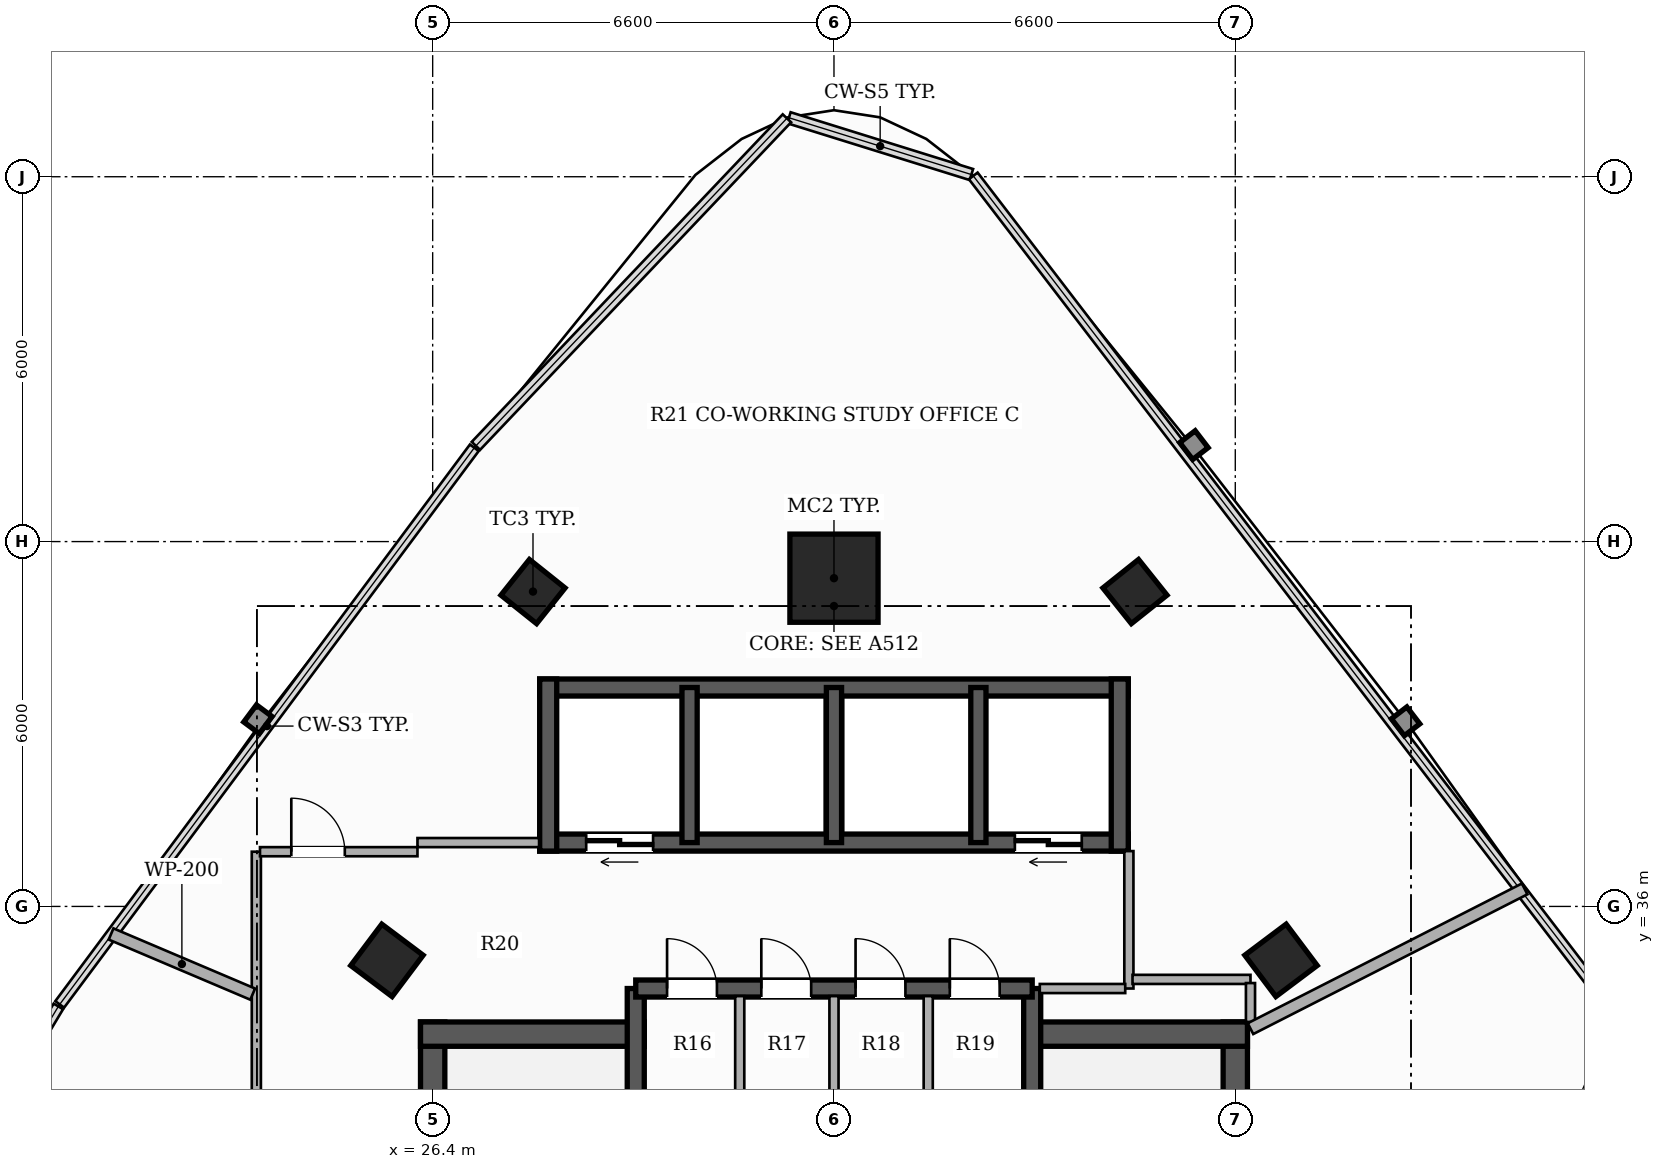
"""IFC4 building model, lengths in metres.
Left out: names, types, materials, properties, quantities, classifications, styles, units other than length and angle.
Written with IfcOpenShell. Run it as: python <this file> out.ifc"""

import sys

from ifc_helpers import new_model, si_unit, direction, frame, frame_2d, origin, origin_2d, place, context, subcontext, project, spatial, rectangle, hollow_rectangle, extrude, element, fill, save


model = new_model("IFC4")
c1 = context("Model", 3, precision=1e-05, world=origin(), true_north=direction((0.0, 1.0)))
c2 = subcontext(c1, "Body", "Model", "MODEL_VIEW")
j1 = project(units=[si_unit("LENGTHUNIT", "METRE"), si_unit("PLANEANGLEUNIT", "RADIAN")], contexts=[c1])
p1 = place(None, origin())
s1 = spatial("IfcSite", under=j1, at=p1, CompositionType="ELEMENT")
p2 = place(p1, origin())
s2 = spatial("IfcBuilding", under=s1, at=p2, CompositionType="ELEMENT")
p3 = place(p2, frame((0.0, 0.0, 133.1)))
s3 = spatial("IfcBuildingStorey", under=s2, at=p3, CompositionType="ELEMENT", Elevation=133.1)
p4 = place(p3, frame((26.4, 26.5, 0.0), z_axis=(0.0, 0.0, 1.0), x_axis=(0.0, 1.0, 0.0)))
e1 = element("IfcWall", 1, at=p4, inside=s3, PredefinedType="SHEAR", context=c2, shape_type="SweptSolid", body=[
    extrude(rectangle(XDim=7.6, YDim=0.4, at=frame_2d((3.8, 0.0))), origin(), (0.0, 0.0, 1.0), 3.3),
])
p5 = place(p3, frame((26.2, 33.9, 0.0), z_axis=(0.0, 0.0, 1.0), x_axis=(1.0, 0.0, 0.0)))
e2 = element("IfcWall", 2, at=p5, inside=s3, PredefinedType="SHEAR", context=c2, shape_type="SweptSolid", body=[
    extrude(rectangle(XDim=3.68, YDim=0.4, at=frame_2d((1.84, 0.0))), origin(), (0.0, 0.0, 1.0), 3.3),
])
p6 = place(p3, frame((39.6, 26.5, 0.0), z_axis=(0.0, 0.0, 1.0), x_axis=(0.0, 1.0, 0.0)))
e3 = element("IfcWall", 3, at=p6, inside=s3, PredefinedType="SHEAR", context=c2, shape_type="SweptSolid", body=[
    extrude(rectangle(XDim=7.6, YDim=0.4, at=frame_2d((3.8, 0.0))), origin(), (0.0, 0.0, 1.0), 3.3),
])
p7 = place(p3, frame((36.12, 33.9, 0.0), z_axis=(0.0, 0.0, 1.0), x_axis=(1.0, 0.0, 0.0)))
e4 = element("IfcWall", 4, at=p7, inside=s3, PredefinedType="SHEAR", context=c2, shape_type="SweptSolid", body=[
    extrude(rectangle(XDim=3.68, YDim=0.4, at=frame_2d((1.84, 0.0))), origin(), (0.0, 0.0, 1.0), 3.3),
])
p8 = place(p3, frame((29.74, 26.5, 0.0), z_axis=(0.0, 0.0, 1.0), x_axis=(0.0, 1.0, 0.0)))
e5 = element("IfcWall", 5, at=p8, inside=s3, PredefinedType="SHEAR", context=c2, shape_type="SweptSolid", body=[
    extrude(rectangle(XDim=8.15, YDim=0.28, at=frame_2d((4.075, 0.0))), origin(), (0.0, 0.0, 1.0), 3.3),
])
p9 = place(p8, frame((0.6, 0.0, 0.0)))
e6 = element("IfcOpeningElement", 6, at=p9, cuts=e5, PredefinedType="OPENING", context=c2, shape_type="SweptSolid", body=[
    extrude(rectangle(XDim=1.05, YDim=2.15, at=frame_2d((0.525, 1.075))), frame((0.0, 0.15, 0.0), z_axis=(0.0, -1.0, 0.0), x_axis=(1.0, 0.0, 0.0)), (0.0, 0.0, 1.0), 0.3),
])
p10 = place(p3, frame((36.26, 26.5, 0.0), z_axis=(0.0, 0.0, 1.0), x_axis=(0.0, 1.0, 0.0)))
e7 = element("IfcWall", 7, at=p10, inside=s3, PredefinedType="SHEAR", context=c2, shape_type="SweptSolid", body=[
    extrude(rectangle(XDim=8.15, YDim=0.28, at=frame_2d((4.075, 0.0))), origin(), (0.0, 0.0, 1.0), 3.3),
])
p11 = place(p10, frame((0.6, 0.0, 0.0)))
e8 = element("IfcOpeningElement", 8, at=p11, cuts=e7, PredefinedType="OPENING", context=c2, shape_type="SweptSolid", body=[
    extrude(rectangle(XDim=1.05, YDim=2.15, at=frame_2d((0.525, 1.075))), frame((0.0, 0.15, 0.0), z_axis=(0.0, -1.0, 0.0), x_axis=(1.0, 0.0, 0.0)), (0.0, 0.0, 1.0), 0.3),
])
p12 = place(p3, frame((29.74, 34.65, 0.0), z_axis=(0.0, 0.0, 1.0), x_axis=(1.0, 0.0, 0.0)))
e9 = element("IfcWall", 9, at=p12, inside=s3, PredefinedType="SHEAR", context=c2, shape_type="SweptSolid", body=[
    extrude(rectangle(XDim=6.52, YDim=0.28, at=frame_2d((3.26, 0.0))), origin(), (0.0, 0.0, 1.0), 3.3),
])
p13 = place(p12, frame((0.515, 0.0, 0.0)))
e10 = element("IfcOpeningElement", 10, at=p13, cuts=e9, PredefinedType="OPENING", context=c2, shape_type="SweptSolid", body=[
    extrude(rectangle(XDim=0.82, YDim=2.1, at=frame_2d((0.41, 1.05))), frame((0.0, 0.15, 0.0), z_axis=(0.0, -1.0, 0.0), x_axis=(1.0, 0.0, 0.0)), (0.0, 0.0, 1.0), 0.3),
])
p14 = place(p12, frame((2.065, 0.0, 0.0)))
e11 = element("IfcOpeningElement", 11, at=p14, cuts=e9, PredefinedType="OPENING", context=c2, shape_type="SweptSolid", body=[
    extrude(rectangle(XDim=0.82, YDim=2.1, at=frame_2d((0.41, 1.05))), frame((0.0, 0.15, 0.0), z_axis=(0.0, -1.0, 0.0), x_axis=(1.0, 0.0, 0.0)), (0.0, 0.0, 1.0), 0.3),
])
p15 = place(p12, frame((3.615, 0.0, 0.0)))
e12 = element("IfcOpeningElement", 12, at=p15, cuts=e9, PredefinedType="OPENING", context=c2, shape_type="SweptSolid", body=[
    extrude(rectangle(XDim=0.82, YDim=2.1, at=frame_2d((0.41, 1.05))), frame((0.0, 0.15, 0.0), z_axis=(0.0, -1.0, 0.0), x_axis=(1.0, 0.0, 0.0)), (0.0, 0.0, 1.0), 0.3),
])
p16 = place(p12, frame((5.165, 0.0, 0.0)))
e13 = element("IfcOpeningElement", 13, at=p16, cuts=e9, PredefinedType="OPENING", context=c2, shape_type="SweptSolid", body=[
    extrude(rectangle(XDim=0.82, YDim=2.1, at=frame_2d((0.41, 1.05))), frame((0.0, 0.15, 0.0), z_axis=(0.0, -1.0, 0.0), x_axis=(1.0, 0.0, 0.0)), (0.0, 0.0, 1.0), 0.3),
])
p17 = place(p3, frame((37.84, 37.05, 0.0), z_axis=(0.0, 0.0, 1.0), x_axis=(-1.0, 0.0, 0.0)))
e14 = element("IfcWall", 14, at=p17, inside=s3, PredefinedType="SHEAR", context=c2, shape_type="SweptSolid", body=[
    extrude(rectangle(XDim=9.68, YDim=0.28, at=frame_2d((4.84, 0.0))), origin(), (0.0, 0.0, 1.0), 3.3),
])
p18 = place(p17, frame((7.815, 0.0, 0.0)))
e15 = element("IfcOpeningElement", 15, at=p18, cuts=e14, PredefinedType="OPENING", context=c2, shape_type="SweptSolid", body=[
    extrude(rectangle(XDim=1.1, YDim=2.2, at=frame_2d((0.55, 1.1))), frame((0.0, 0.15, 0.0), z_axis=(0.0, -1.0, 0.0), x_axis=(1.0, 0.0, 0.0)), (0.0, 0.0, 1.0), 0.3),
])
p19 = place(p17, frame((0.765, 0.0, 0.0)))
e16 = element("IfcOpeningElement", 16, at=p19, cuts=e14, PredefinedType="OPENING", context=c2, shape_type="SweptSolid", body=[
    extrude(rectangle(XDim=1.1, YDim=2.2, at=frame_2d((0.55, 1.1))), frame((0.0, 0.15, 0.0), z_axis=(0.0, -1.0, 0.0), x_axis=(1.0, 0.0, 0.0)), (0.0, 0.0, 1.0), 0.3),
])
p20 = place(p3, frame((28.16, 39.6, 0.0), z_axis=(0.0, 0.0, 1.0), x_axis=(1.0, 0.0, 0.0)))
e17 = element("IfcWall", 17, at=p20, inside=s3, PredefinedType="SHEAR", context=c2, shape_type="SweptSolid", body=[
    extrude(rectangle(XDim=9.68, YDim=0.28, at=frame_2d((4.84, 0.0))), origin(), (0.0, 0.0, 1.0), 3.3),
])
for number, where, z_axis, x_axis in (
    (18, (28.3, 36.91, 0.0), (0.0, 0.0, 1.0), (0.0, 1.0, 0.0)),
    (19, (37.7, 36.91, 0.0), (0.0, 0.0, 1.0), (0.0, 1.0, 0.0)),
):
    element("IfcWall", number, at=place(p3, frame(where, z_axis=z_axis, x_axis=x_axis)), inside=s3, PredefinedType="SHEAR", context=c2, shape_type="SweptSolid", body=[
        extrude(rectangle(XDim=2.83, YDim=0.28, at=frame_2d((1.415, 0.0))), origin(), (0.0, 0.0, 1.0), 3.3),
    ])
for number, where, z_axis, x_axis in (
    (20, (30.625, 37.05, 0.0), (0.0, 0.0, 1.0), (0.0, 1.0, 0.0)),
    (21, (33.0, 37.05, 0.0), (0.0, 0.0, 1.0), (0.0, 1.0, 0.0)),
    (22, (35.375, 37.05, 0.0), (0.0, 0.0, 1.0), (0.0, 1.0, 0.0)),
):
    element("IfcWall", number, at=place(p3, frame(where, z_axis=z_axis, x_axis=x_axis)), inside=s3, PredefinedType="SHEAR", context=c2, shape_type="SweptSolid", body=[
        extrude(rectangle(XDim=2.55, YDim=0.25, at=frame_2d((1.275, 0.0))), origin(), (0.0, 0.0, 1.0), 3.3),
    ])
p21 = place(p3, frame((33.0, 41.398, 0.0), z_axis=(0.0, 0.0, 1.0), x_axis=(1.0, 0.0, 0.0)))
e23 = element("IfcColumn", 23, at=p21, inside=s3, PredefinedType="COLUMN", context=c2, shape_type="SweptSolid", body=[
    extrude(hollow_rectangle(XDim=1.45, YDim=1.45, WallThickness=0.045, at=origin_2d()), origin(), (0.0, 0.0, 1.0), 3.3),
])
for number, where, z_axis, x_axis in (
    (24, (25.648, 35.113, 0.0), (0.0, 0.0, 1.0), (0.6, 0.8, 0.0)),
    (25, (40.352, 35.113, 0.0), (0.0, 0.0, 1.0), (-0.6, 0.8, 0.0)),
):
    element("IfcColumn", number, at=place(p3, frame(where, z_axis=z_axis, x_axis=x_axis)), inside=s3, PredefinedType="COLUMN", context=c2, shape_type="SweptSolid", body=[
        extrude(hollow_rectangle(XDim=0.85, YDim=0.85, WallThickness=0.028, at=origin_2d()), origin(), (0.0, 0.0, 1.0), 3.3),
    ])
for number, where, z_axis, x_axis in (
    (26, (28.05, 41.178, 0.0), (0.0, 0.0, 1.0), (0.624, 0.782, 0.0)),
    (27, (37.95, 41.178, 0.0), (0.0, 0.0, 1.0), (-0.624, 0.782, 0.0)),
):
    element("IfcColumn", number, at=place(p3, frame(where, z_axis=z_axis, x_axis=x_axis)), inside=s3, PredefinedType="COLUMN", context=c2, shape_type="SweptSolid", body=[
        extrude(hollow_rectangle(XDim=0.75, YDim=0.75, WallThickness=0.025, at=origin_2d()), origin(), (0.0, 0.0, 1.0), 3.3),
    ])
p22 = place(p3, frame((37.85, 34.65, 0.0), z_axis=(0.0, 0.0, 1.0), x_axis=(0.0, 1.0, 0.0)))
e28 = element("IfcWall", 28, at=p22, inside=s3, PredefinedType="PARTITIONING", context=c2, shape_type="SweptSolid", body=[
    extrude(rectangle(XDim=2.26, YDim=0.15, at=frame_2d((1.13, 0.0))), origin(), (0.0, 0.0, 1.0), 3.06),
])
p23 = place(p3, frame((36.385, 34.65, 0.0), z_axis=(0.0, 0.0, 1.0), x_axis=(1.0, 0.0, 0.0)))
e29 = element("IfcWall", 29, at=p23, inside=s3, PredefinedType="PARTITIONING", context=c2, shape_type="SweptSolid", body=[
    extrude(rectangle(XDim=1.405, YDim=0.15, at=frame_2d((0.703, 0.0))), origin(), (0.0, 0.0, 1.0), 2.425),
])
for number, where, z_axis, x_axis in (
    (30, (31.45, 32.915, 0.0), (0.0, 0.0, 1.0), (0.0, 1.0, 0.0)),
    (31, (33.0, 32.915, 0.0), (0.0, 0.0, 1.0), (0.0, 1.0, 0.0)),
    (32, (34.55, 32.915, 0.0), (0.0, 0.0, 1.0), (0.0, 1.0, 0.0)),
):
    element("IfcWall", number, at=place(p3, frame(where, z_axis=z_axis, x_axis=x_axis)), inside=s3, PredefinedType="PARTITIONING", context=c2, shape_type="SweptSolid", body=[
        extrude(rectangle(XDim=1.61, YDim=0.15, at=frame_2d((0.805, 0.0))), origin(), (0.0, 0.0, 1.0), 3.06),
    ])
p24 = place(p3, frame((23.5, 14.06, 0.0), z_axis=(0.0, 0.0, 1.0), x_axis=(0.0, 1.0, 0.0)))
e33 = element("IfcWall", 33, at=p24, inside=s3, PredefinedType="PARTITIONING", context=c2, shape_type="SweptSolid", body=[
    extrude(rectangle(XDim=22.84, YDim=0.15, at=frame_2d((11.42, 0.0))), origin(), (0.0, 0.0, 1.0), 2.413),
])
p25 = place(p24, frame((13.045, 0.0, 0.0)))
e34 = element("IfcOpeningElement", 34, at=p25, cuts=e33, PredefinedType="OPENING", context=c2, shape_type="SweptSolid", body=[
    extrude(rectangle(XDim=0.88, YDim=2.1, at=frame_2d((0.44, 1.05))), frame((0.0, 0.085, 0.0), z_axis=(0.0, -1.0, 0.0), x_axis=(1.0, 0.0, 0.0)), (0.0, 0.0, 1.0), 0.17),
])
p26 = place(p24, frame((2.977, 0.0, 0.0)))
e35 = element("IfcOpeningElement", 35, at=p26, cuts=e33, PredefinedType="OPENING", context=c2, shape_type="SweptSolid", body=[
    extrude(rectangle(XDim=0.92, YDim=2.15, at=frame_2d((0.46, 1.075))), frame((0.0, 0.085, 0.0), z_axis=(0.0, -1.0, 0.0), x_axis=(1.0, 0.0, 0.0)), (0.0, 0.0, 1.0), 0.17),
])
p27 = place(p3, frame((23.56, 36.9, 0.0), z_axis=(0.0, 0.0, 1.0), x_axis=(1.0, 0.0, 0.0)))
e36 = element("IfcWall", 36, at=p27, inside=s3, PredefinedType="PARTITIONING", context=c2, shape_type="SweptSolid", body=[
    extrude(rectangle(XDim=2.59, YDim=0.15, at=frame_2d((1.295, 0.0))), origin(), (0.0, 0.0, 1.0), 2.413),
])
p28 = place(p27, frame((0.515, 0.0, 0.0)))
e37 = element("IfcOpeningElement", 37, at=p28, cuts=e36, PredefinedType="OPENING", context=c2, shape_type="SweptSolid", body=[
    extrude(rectangle(XDim=0.88, YDim=2.1, at=frame_2d((0.44, 1.05))), frame((0.0, 0.085, 0.0), z_axis=(0.0, -1.0, 0.0), x_axis=(1.0, 0.0, 0.0)), (0.0, 0.0, 1.0), 0.17),
])
p29 = place(p3, frame((26.15, 37.05, 0.0), z_axis=(0.0, 0.0, 1.0), x_axis=(1.0, 0.0, 0.0)))
e38 = element("IfcWall", 38, at=p29, inside=s3, PredefinedType="PARTITIONING", context=c2, shape_type="SweptSolid", body=[
    extrude(rectangle(XDim=2.0, YDim=0.15, at=frame_2d((1.0, 0.0))), origin(), (0.0, 0.0, 1.0), 2.413),
])
p30 = place(p3, frame((37.91, 34.8, 0.0), z_axis=(0.0, 0.0, 1.0), x_axis=(1.0, 0.0, 0.0)))
e39 = element("IfcWall", 39, at=p30, inside=s3, PredefinedType="PARTITIONING", context=c2, shape_type="SweptSolid", body=[
    extrude(rectangle(XDim=1.94, YDim=0.15, at=frame_2d((0.97, 0.0))), origin(), (0.0, 0.0, 1.0), 2.721),
])
p31 = place(p3, frame((39.85, 34.74, 0.0), z_axis=(0.0, 0.0, 1.0), x_axis=(0.0, -1.0, 0.0)))
e40 = element("IfcWall", 40, at=p31, inside=s3, PredefinedType="PARTITIONING", context=c2, shape_type="SweptSolid", body=[
    extrude(rectangle(XDim=0.64, YDim=0.15, at=frame_2d((0.32, 0.0))), origin(), (0.0, 0.0, 1.0), 2.721),
])
p32 = place(p3, frame((21.111, 35.547, 0.0), z_axis=(0.0, 0.0, 1.0), x_axis=(0.920437694564, -0.390889307126, 0.0)))
e41 = element("IfcWall", 41, at=p32, inside=s3, PredefinedType="PARTITIONING", context=c2, shape_type="SweptSolid", body=[
    extrude(rectangle(XDim=2.53, YDim=0.2, at=frame_2d((1.265, 0.0))), origin(), (0.0, 0.0, 1.0), 3.06),
])
p33 = place(p3, frame((44.359, 36.288, 0.0), z_axis=(0.0, 0.0, 1.0), x_axis=(-0.890946333403, -0.454108611453, 0.0)))
e42 = element("IfcWall", 42, at=p33, inside=s3, PredefinedType="PARTITIONING", context=c2, shape_type="SweptSolid", body=[
    extrude(rectangle(XDim=5.061, YDim=0.2, at=frame_2d((2.53, 0.0))), origin(), (0.0, 0.0, 1.0), 2.413),
])
p34 = place(p18, origin())
e43 = element("IfcDoor", 43, at=p34, inside=s3, OperationType="DOUBLE_DOOR_SLIDING", PredefinedType="DOOR", context=c2, shape_type="SweptSolid", body=[
    extrude(rectangle(XDim=1.1, YDim=2.2, at=frame_2d((0.55, 1.1))), frame((0.0, 0.025, 0.0), z_axis=(0.0, -1.0, 0.0), x_axis=(1.0, 0.0, 0.0)), (0.0, 0.0, 1.0), 0.05),
])
fill(e15, e43)
p35 = place(p19, origin())
e44 = element("IfcDoor", 44, at=p35, inside=s3, OperationType="DOUBLE_DOOR_SLIDING", PredefinedType="DOOR", context=c2, shape_type="SweptSolid", body=[
    extrude(rectangle(XDim=1.1, YDim=2.2, at=frame_2d((0.55, 1.1))), frame((0.0, 0.025, 0.0), z_axis=(0.0, -1.0, 0.0), x_axis=(1.0, 0.0, 0.0)), (0.0, 0.0, 1.0), 0.05),
])
fill(e16, e44)
p36 = place(p13, origin())
e45 = element("IfcDoor", 45, at=p36, inside=s3, OperationType="SINGLE_SWING_LEFT", PredefinedType="DOOR", context=c2, shape_type="SweptSolid", body=[
    extrude(rectangle(XDim=0.82, YDim=2.1, at=frame_2d((0.41, 1.05))), frame((0.0, 0.025, 0.0), z_axis=(0.0, -1.0, 0.0), x_axis=(1.0, 0.0, 0.0)), (0.0, 0.0, 1.0), 0.05),
])
fill(e10, e45)
p37 = place(p14, origin())
e46 = element("IfcDoor", 46, at=p37, inside=s3, OperationType="SINGLE_SWING_LEFT", PredefinedType="DOOR", context=c2, shape_type="SweptSolid", body=[
    extrude(rectangle(XDim=0.82, YDim=2.1, at=frame_2d((0.41, 1.05))), frame((0.0, 0.025, 0.0), z_axis=(0.0, -1.0, 0.0), x_axis=(1.0, 0.0, 0.0)), (0.0, 0.0, 1.0), 0.05),
])
fill(e11, e46)
p38 = place(p15, origin())
e47 = element("IfcDoor", 47, at=p38, inside=s3, OperationType="SINGLE_SWING_LEFT", PredefinedType="DOOR", context=c2, shape_type="SweptSolid", body=[
    extrude(rectangle(XDim=0.82, YDim=2.1, at=frame_2d((0.41, 1.05))), frame((0.0, 0.025, 0.0), z_axis=(0.0, -1.0, 0.0), x_axis=(1.0, 0.0, 0.0)), (0.0, 0.0, 1.0), 0.05),
])
fill(e12, e47)
p39 = place(p16, origin())
e48 = element("IfcDoor", 48, at=p39, inside=s3, OperationType="SINGLE_SWING_LEFT", PredefinedType="DOOR", context=c2, shape_type="SweptSolid", body=[
    extrude(rectangle(XDim=0.82, YDim=2.1, at=frame_2d((0.41, 1.05))), frame((0.0, 0.025, 0.0), z_axis=(0.0, -1.0, 0.0), x_axis=(1.0, 0.0, 0.0)), (0.0, 0.0, 1.0), 0.05),
])
fill(e13, e48)
p40 = place(p28, origin())
e49 = element("IfcDoor", 49, at=p40, inside=s3, OperationType="SINGLE_SWING_LEFT", PredefinedType="DOOR", context=c2, shape_type="SweptSolid", body=[
    extrude(rectangle(XDim=0.88, YDim=2.1, at=frame_2d((0.44, 1.05))), frame((0.0, 0.025, 0.0), z_axis=(0.0, -1.0, 0.0), x_axis=(1.0, 0.0, 0.0)), (0.0, 0.0, 1.0), 0.05),
])
fill(e37, e49)
save(model, sys.argv[1])
